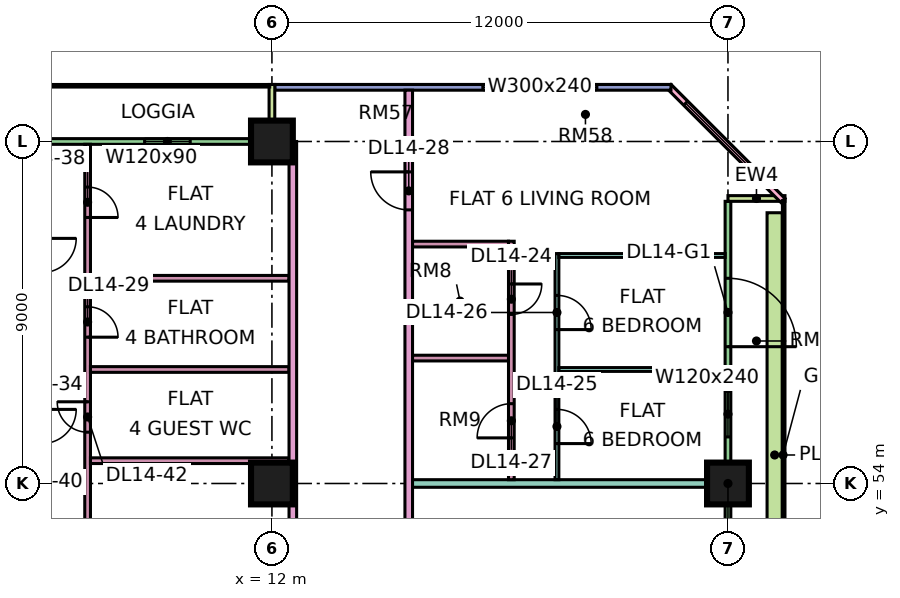
"""IFC4 building model, lengths in metres.
Left out: names, types, materials, properties, quantities, classifications, styles, units other than length and angle.
Written with IfcOpenShell. Run it as: python <this file> out.ifc"""

import sys

from ifc_helpers import new_model, si_unit, direction, frame, frame_2d, origin, origin_2d, place, context, subcontext, project, spatial, rectangle, extrude, element, fill, save


model = new_model("IFC4")
c1 = context("Model", 3, precision=1e-05, world=origin(), true_north=direction((0.0, 1.0)))
c2 = subcontext(c1, "Body", "Model", "MODEL_VIEW")
j1 = project(units=[si_unit("LENGTHUNIT", "METRE"), si_unit("PLANEANGLEUNIT", "RADIAN")], contexts=[c1])
p1 = place(None, origin())
s1 = spatial("IfcSite", under=j1, at=p1, CompositionType="ELEMENT")
p2 = place(p1, origin())
s2 = spatial("IfcBuilding", under=s1, at=p2, CompositionType="ELEMENT")
p3 = place(p2, frame((0.0, 0.0, 67.65)))
s3 = spatial("IfcBuildingStorey", under=s2, at=p3, CompositionType="ELEMENT", Elevation=67.65)
for number, where, z_axis, x_axis in (
    (1, (12.0, 54.0, 0.0), (0.0, 0.0, 1.0), (1.0, 0.0, 0.0)),
    (2, (12.0, 63.0, 0.0), (0.0, 0.0, 1.0), (1.0, 0.0, 0.0)),
    (3, (24.0, 54.0, 0.0), (0.0, 0.0, 1.0), (1.0, 0.0, 0.0)),
):
    element("IfcColumn", number, at=place(p3, frame(where, z_axis=z_axis, x_axis=x_axis)), inside=s3, PredefinedType="COLUMN", context=c2, shape_type="SweptSolid", body=[
        extrude(rectangle(XDim=1.1, YDim=1.1, at=origin_2d()), origin(), (0.0, 0.0, 1.0), 3.75),
    ])
p4 = place(p3, frame((24.0, 48.075, 0.0), z_axis=(0.0, 0.0, 1.0), x_axis=(0.0, 1.0, 0.0)))
e4 = element("IfcWall", 4, at=p4, inside=s3, PredefinedType="SOLIDWALL", context=c2, shape_type="SweptSolid", body=[
    extrude(rectangle(XDim=13.35, YDim=0.15, at=frame_2d((6.675, 0.0))), origin(), (0.0, 0.0, 1.0), 3.35),
])
p5 = place(p4, frame((0.538, 0.0, 0.45)))
e5 = element("IfcOpeningElement", 5, at=p5, cuts=e4, PredefinedType="OPENING", context=c2, shape_type="SweptSolid", body=[
    extrude(rectangle(XDim=4.2, YDim=2.4, at=frame_2d((2.1, 1.2))), frame((0.0, 0.085, 0.0), z_axis=(0.0, -1.0, 0.0), x_axis=(1.0, 0.0, 0.0)), (0.0, 0.0, 1.0), 0.17),
])
p6 = place(p4, frame((7.15, 0.0, 0.45)))
e6 = element("IfcOpeningElement", 6, at=p6, cuts=e4, PredefinedType="OPENING", context=c2, shape_type="SweptSolid", body=[
    extrude(rectangle(XDim=1.2, YDim=2.4, at=frame_2d((0.6, 1.2))), frame((0.0, 0.085, 0.0), z_axis=(0.0, -1.0, 0.0), x_axis=(1.0, 0.0, 0.0)), (0.0, 0.0, 1.0), 0.17),
])
p7 = place(p4, frame((9.525, 0.0, 0.0)))
e7 = element("IfcOpeningElement", 7, at=p7, cuts=e4, PredefinedType="OPENING", context=c2, shape_type="SweptSolid", body=[
    extrude(rectangle(XDim=1.8, YDim=2.4, at=frame_2d((0.9, 1.2))), frame((0.0, 0.085, 0.0), z_axis=(0.0, -1.0, 0.0), x_axis=(1.0, 0.0, 0.0)), (0.0, 0.0, 1.0), 0.17),
])
p8 = place(p3, frame((25.5, 61.5, 0.0), z_axis=(0.0, 0.0, 1.0), x_axis=(-1.0, 0.0, 0.0)))
e8 = element("IfcWall", 8, at=p8, inside=s3, PredefinedType="SOLIDWALL", context=c2, shape_type="SweptSolid", body=[
    extrude(rectangle(XDim=1.5, YDim=0.15, at=frame_2d((0.75, 0.0))), origin(), (0.0, 0.0, 1.0), 3.35),
])
p9 = place(p3, frame((25.447, 61.447, 0.0), z_axis=(0.0, 0.0, 1.0), x_axis=(-0.707106781187, 0.707106781187, 0.0)))
e9 = element("IfcWall", 9, at=p9, inside=s3, PredefinedType="SOLIDWALL", context=c2, shape_type="SweptSolid", body=[
    extrude(rectangle(XDim=4.243, YDim=0.15, at=frame_2d((2.121, 0.0))), origin(), (0.0, 0.0, 1.0), 3.35),
])
p10 = place(p9, frame((0.621, 0.0, 0.45)))
e10 = element("IfcOpeningElement", 10, at=p10, cuts=e9, PredefinedType="OPENING", context=c2, shape_type="SweptSolid", body=[
    extrude(rectangle(XDim=3.0, YDim=2.4, at=frame_2d((1.5, 1.2))), frame((0.0, 0.085, 0.0), z_axis=(0.0, -1.0, 0.0), x_axis=(1.0, 0.0, 0.0)), (0.0, 0.0, 1.0), 0.17),
])
p11 = place(p3, frame((22.5, 64.425, 0.0), z_axis=(0.0, 0.0, 1.0), x_axis=(-1.0, 0.0, 0.0)))
e11 = element("IfcWall", 11, at=p11, inside=s3, PredefinedType="SOLIDWALL", context=c2, shape_type="SweptSolid", body=[
    extrude(rectangle(XDim=10.425, YDim=0.15, at=frame_2d((5.212, 0.0))), origin(), (0.0, 0.0, 1.0), 3.35),
])
p12 = place(p11, frame((1.95, 0.0, 0.45)))
e12 = element("IfcOpeningElement", 12, at=p12, cuts=e11, PredefinedType="OPENING", context=c2, shape_type="SweptSolid", body=[
    extrude(rectangle(XDim=3.0, YDim=2.4, at=frame_2d((1.5, 1.2))), frame((0.0, 0.085, 0.0), z_axis=(0.0, -1.0, 0.0), x_axis=(1.0, 0.0, 0.0)), (0.0, 0.0, 1.0), 0.17),
])
p13 = place(p3, frame((11.925, 63.0, 0.0), z_axis=(0.0, 0.0, 1.0), x_axis=(-1.0, 0.0, 0.0)))
e13 = element("IfcWall", 13, at=p13, inside=s3, PredefinedType="SOLIDWALL", context=c2, shape_type="SweptSolid", body=[
    extrude(rectangle(XDim=10.35, YDim=0.15, at=frame_2d((5.175, 0.0))), origin(), (0.0, 0.0, 1.0), 3.35),
])
p14 = place(p13, frame((2.075, 0.0, 1.7)))
e14 = element("IfcOpeningElement", 14, at=p14, cuts=e13, PredefinedType="OPENING", context=c2, shape_type="SweptSolid", body=[
    extrude(rectangle(XDim=1.2, YDim=0.9, at=frame_2d((0.6, 0.45))), frame((0.0, 0.085, 0.0), z_axis=(0.0, -1.0, 0.0), x_axis=(1.0, 0.0, 0.0)), (0.0, 0.0, 1.0), 0.17),
])
p15 = place(p13, frame((7.262, 0.0, 0.0)))
e15 = element("IfcOpeningElement", 15, at=p15, cuts=e13, PredefinedType="OPENING", context=c2, shape_type="SweptSolid", body=[
    extrude(rectangle(XDim=1.8, YDim=2.4, at=frame_2d((0.9, 1.2))), frame((0.0, 0.085, 0.0), z_axis=(0.0, -1.0, 0.0), x_axis=(1.0, 0.0, 0.0)), (0.0, 0.0, 1.0), 0.17),
])
p16 = place(p3, frame((12.0, 64.5, 0.0), z_axis=(0.0, 0.0, 1.0), x_axis=(0.0, -1.0, 0.0)))
e16 = element("IfcWall", 16, at=p16, inside=s3, PredefinedType="SOLIDWALL", context=c2, shape_type="SweptSolid", body=[
    extrude(rectangle(XDim=1.5, YDim=0.15, at=frame_2d((0.75, 0.0))), origin(), (0.0, 0.0, 1.0), 3.35),
])
p17 = place(p3, frame((25.229, 48.375, 0.0), z_axis=(0.0, 0.0, 1.0), x_axis=(0.0, 1.0, 0.0)))
e17 = element("IfcWall", 17, at=p17, inside=s3, PredefinedType="SOLIDWALL", context=c2, shape_type="SweptSolid", body=[
    extrude(rectangle(XDim=12.75, YDim=0.4, at=frame_2d((6.375, 0.0))), origin(), (0.0, 0.0, 1.0), 0.7),
])
p18 = place(p3, frame((7.15, 48.25, 0.0), z_axis=(0.0, 0.0, 1.0), x_axis=(0.0, 1.0, 0.0)))
e18 = element("IfcWall", 18, at=p18, inside=s3, PredefinedType="PARTITIONING", context=c2, shape_type="SweptSolid", body=[
    extrude(rectangle(XDim=14.676, YDim=0.15, at=frame_2d((7.338, 0.0))), origin(), (0.0, 0.0, 1.0), 3.35),
])
p19 = place(p18, frame((9.6, 0.0, 0.0)))
e19 = element("IfcOpeningElement", 19, at=p19, cuts=e18, PredefinedType="OPENING", context=c2, shape_type="SweptSolid", body=[
    extrude(rectangle(XDim=0.8, YDim=2.1, at=frame_2d((0.4, 1.05))), frame((0.0, 0.085, 0.0), z_axis=(0.0, -1.0, 0.0), x_axis=(1.0, 0.0, 0.0)), (0.0, 0.0, 1.0), 0.17),
])
p20 = place(p18, frame((12.75, 0.0, 0.0)))
e20 = element("IfcOpeningElement", 20, at=p20, cuts=e18, PredefinedType="OPENING", context=c2, shape_type="SweptSolid", body=[
    extrude(rectangle(XDim=0.8, YDim=2.1, at=frame_2d((0.4, 1.05))), frame((0.0, 0.085, 0.0), z_axis=(0.0, -1.0, 0.0), x_axis=(1.0, 0.0, 0.0)), (0.0, 0.0, 1.0), 0.17),
])
p21 = place(p18, frame((7.1, 0.0, 0.0)))
e21 = element("IfcOpeningElement", 21, at=p21, cuts=e18, PredefinedType="OPENING", context=c2, shape_type="SweptSolid", body=[
    extrude(rectangle(XDim=0.8, YDim=2.1, at=frame_2d((0.4, 1.05))), frame((0.0, 0.085, 0.0), z_axis=(0.0, -1.0, 0.0), x_axis=(1.0, 0.0, 0.0)), (0.0, 0.0, 1.0), 0.17),
])
for number, where, z_axis, x_axis in (
    (22, (7.225, 54.6, 0.0), (0.0, 0.0, 1.0), (1.0, 0.0, 0.0)),
    (23, (7.225, 57.0, 0.0), (0.0, 0.0, 1.0), (1.0, 0.0, 0.0)),
    (24, (7.225, 59.4, 0.0), (0.0, 0.0, 1.0), (1.0, 0.0, 0.0)),
):
    element("IfcWall", number, at=place(p3, frame(where, z_axis=z_axis, x_axis=x_axis)), inside=s3, PredefinedType="PARTITIONING", context=c2, shape_type="SweptSolid", body=[
        extrude(rectangle(XDim=5.225, YDim=0.15, at=frame_2d((2.612, 0.0))), origin(), (0.0, 0.0, 1.0), 3.35),
    ])
p22 = place(p3, frame((12.55, 20.0, 0.0), z_axis=(0.0, 0.0, 1.0), x_axis=(0.0, 1.0, 0.0)))
e25 = element("IfcWall", 25, at=p22, inside=s3, PredefinedType="PARTITIONING", context=c2, shape_type="SweptSolid", body=[
    extrude(rectangle(XDim=43.0, YDim=0.2, at=frame_2d((21.5, 0.0))), origin(), (0.0, 0.0, 1.0), 3.35),
])
p23 = place(p22, frame((25.8, 0.0, 0.0)))
e26 = element("IfcOpeningElement", 26, at=p23, cuts=e25, PredefinedType="OPENING", context=c2, shape_type="SweptSolid", body=[
    extrude(rectangle(XDim=1.0, YDim=2.1, at=frame_2d((0.5, 1.05))), frame((0.0, 0.11, 0.0), z_axis=(0.0, -1.0, 0.0), x_axis=(1.0, 0.0, 0.0)), (0.0, 0.0, 1.0), 0.22),
])
p24 = place(p22, frame((0.6, 0.0, 0.0)))
e27 = element("IfcOpeningElement", 27, at=p24, cuts=e25, PredefinedType="OPENING", context=c2, shape_type="SweptSolid", body=[
    extrude(rectangle(XDim=1.2, YDim=2.1, at=frame_2d((0.6, 1.05))), frame((0.0, 0.11, 0.0), z_axis=(0.0, -1.0, 0.0), x_axis=(1.0, 0.0, 0.0)), (0.0, 0.0, 1.0), 0.22),
])
p25 = place(p22, frame((14.25, 0.0, 0.0)))
e28 = element("IfcOpeningElement", 28, at=p25, cuts=e25, PredefinedType="OPENING", context=c2, shape_type="SweptSolid", body=[
    extrude(rectangle(XDim=1.0, YDim=2.1, at=frame_2d((0.5, 1.05))), frame((0.0, 0.11, 0.0), z_axis=(0.0, -1.0, 0.0), x_axis=(1.0, 0.0, 0.0)), (0.0, 0.0, 1.0), 0.22),
])
p26 = place(p3, frame((15.6, 51.225, 0.0), z_axis=(0.0, 0.0, 1.0), x_axis=(0.0, 1.0, 0.0)))
e29 = element("IfcWall", 29, at=p26, inside=s3, PredefinedType="PARTITIONING", context=c2, shape_type="SweptSolid", body=[
    extrude(rectangle(XDim=13.125, YDim=0.2, at=frame_2d((6.562, 0.0))), origin(), (0.0, 0.0, 1.0), 3.35),
])
p27 = place(p26, frame((9.975, 0.0, 0.0)))
e30 = element("IfcOpeningElement", 30, at=p27, cuts=e29, PredefinedType="OPENING", context=c2, shape_type="SweptSolid", body=[
    extrude(rectangle(XDim=1.0, YDim=2.1, at=frame_2d((0.5, 1.05))), frame((0.0, 0.11, 0.0), z_axis=(0.0, -1.0, 0.0), x_axis=(1.0, 0.0, 0.0)), (0.0, 0.0, 1.0), 0.22),
])
p28 = place(p3, frame((15.7, 54.0, 0.0), z_axis=(0.0, 0.0, 1.0), x_axis=(1.0, 0.0, 0.0)))
e31 = element("IfcWall", 31, at=p28, inside=s3, PredefinedType="PARTITIONING", context=c2, shape_type="SweptSolid", body=[
    extrude(rectangle(XDim=8.226, YDim=0.2, at=frame_2d((4.113, 0.0))), origin(), (0.0, 0.0, 1.0), 3.35),
])
for number, where, z_axis, x_axis in (
    (32, (15.7, 57.3, 0.0), (0.0, 0.0, 1.0), (1.0, 0.0, 0.0)),
    (33, (15.7, 60.3, 0.0), (0.0, 0.0, 1.0), (1.0, 0.0, 0.0)),
):
    element("IfcWall", number, at=place(p3, frame(where, z_axis=z_axis, x_axis=x_axis)), inside=s3, PredefinedType="PARTITIONING", context=c2, shape_type="SweptSolid", body=[
        extrude(rectangle(XDim=2.525, YDim=0.15, at=frame_2d((1.263, 0.0))), origin(), (0.0, 0.0, 1.0), 3.35),
    ])
p29 = place(p3, frame((18.3, 54.1, 0.0), z_axis=(0.0, 0.0, 1.0), x_axis=(0.0, 1.0, 0.0)))
e34 = element("IfcWall", 34, at=p29, inside=s3, PredefinedType="PARTITIONING", context=c2, shape_type="SweptSolid", body=[
    extrude(rectangle(XDim=6.275, YDim=0.15, at=frame_2d((3.137, 0.0))), origin(), (0.0, 0.0, 1.0), 3.35),
])
p30 = place(p29, frame((4.35, 0.0, 0.0)))
e35 = element("IfcOpeningElement", 35, at=p30, cuts=e34, PredefinedType="OPENING", context=c2, shape_type="SweptSolid", body=[
    extrude(rectangle(XDim=0.8, YDim=2.1, at=frame_2d((0.4, 1.05))), frame((0.0, 0.085, 0.0), z_axis=(0.0, -1.0, 0.0), x_axis=(1.0, 0.0, 0.0)), (0.0, 0.0, 1.0), 0.17),
])
p31 = place(p29, frame((1.1, 0.0, 0.0)))
e36 = element("IfcOpeningElement", 36, at=p31, cuts=e34, PredefinedType="OPENING", context=c2, shape_type="SweptSolid", body=[
    extrude(rectangle(XDim=0.9, YDim=2.1, at=frame_2d((0.45, 1.05))), frame((0.0, 0.085, 0.0), z_axis=(0.0, -1.0, 0.0), x_axis=(1.0, 0.0, 0.0)), (0.0, 0.0, 1.0), 0.17),
])
p32 = place(p3, frame((19.5, 54.1, 0.0), z_axis=(0.0, 0.0, 1.0), x_axis=(0.0, 1.0, 0.0)))
e37 = element("IfcWall", 37, at=p32, inside=s3, PredefinedType="PARTITIONING", context=c2, shape_type="SweptSolid", body=[
    extrude(rectangle(XDim=5.95, YDim=0.1, at=frame_2d((2.975, 0.0))), origin(), (0.0, 0.0, 1.0), 3.35),
])
p33 = place(p32, frame((0.95, 0.0, 0.0)))
e38 = element("IfcOpeningElement", 38, at=p33, cuts=e37, PredefinedType="OPENING", context=c2, shape_type="SweptSolid", body=[
    extrude(rectangle(XDim=0.9, YDim=2.1, at=frame_2d((0.45, 1.05))), frame((0.0, 0.06, 0.0), z_axis=(0.0, -1.0, 0.0), x_axis=(1.0, 0.0, 0.0)), (0.0, 0.0, 1.0), 0.12),
])
p34 = place(p32, frame((3.95, 0.0, 0.0)))
e39 = element("IfcOpeningElement", 39, at=p34, cuts=e37, PredefinedType="OPENING", context=c2, shape_type="SweptSolid", body=[
    extrude(rectangle(XDim=0.9, YDim=2.1, at=frame_2d((0.45, 1.05))), frame((0.0, 0.06, 0.0), z_axis=(0.0, -1.0, 0.0), x_axis=(1.0, 0.0, 0.0)), (0.0, 0.0, 1.0), 0.12),
])
for number, where, z_axis, x_axis in (
    (40, (19.55, 57.0, 0.0), (0.0, 0.0, 1.0), (1.0, 0.0, 0.0)),
    (41, (19.55, 60.0, 0.0), (0.0, 0.0, 1.0), (1.0, 0.0, 0.0)),
):
    element("IfcWall", number, at=place(p3, frame(where, z_axis=z_axis, x_axis=x_axis)), inside=s3, PredefinedType="PARTITIONING", context=c2, shape_type="SweptSolid", body=[
        extrude(rectangle(XDim=4.376, YDim=0.1, at=frame_2d((2.188, 0.0))), origin(), (0.0, 0.0, 1.0), 3.35),
    ])
p35 = place(p6, origin())
e42 = element("IfcWindow", 42, at=p35, inside=s3, PartitioningType="SINGLE_PANEL", PredefinedType="WINDOW", context=c2, shape_type="SweptSolid", body=[
    extrude(rectangle(XDim=1.2, YDim=2.4, at=frame_2d((0.6, 1.2))), frame((0.0, 0.03, 0.0), z_axis=(0.0, -1.0, 0.0), x_axis=(1.0, 0.0, 0.0)), (0.0, 0.0, 1.0), 0.06),
])
fill(e6, e42)
p36 = place(p7, frame((1.8, 0.0, 0.0), z_axis=(0.0, 0.0, 1.0), x_axis=(-1.0, 0.0, 0.0)))
e43 = element("IfcDoor", 43, at=p36, inside=s3, OperationType="DOUBLE_DOOR_SINGLE_SWING", PredefinedType="DOOR", context=c2, shape_type="SweptSolid", body=[
    extrude(rectangle(XDim=1.8, YDim=2.4, at=frame_2d((0.9, 1.2))), frame((0.0, 0.025, 0.0), z_axis=(0.0, -1.0, 0.0), x_axis=(1.0, 0.0, 0.0)), (0.0, 0.0, 1.0), 0.05),
])
fill(e7, e43)
p37 = place(p10, origin())
e44 = element("IfcWindow", 44, at=p37, inside=s3, PartitioningType="SINGLE_PANEL", PredefinedType="WINDOW", context=c2, shape_type="SweptSolid", body=[
    extrude(rectangle(XDim=3.0, YDim=2.4, at=frame_2d((1.5, 1.2))), frame((0.0, 0.03, 0.0), z_axis=(0.0, -1.0, 0.0), x_axis=(1.0, 0.0, 0.0)), (0.0, 0.0, 1.0), 0.06),
])
fill(e10, e44)
p38 = place(p12, origin())
e45 = element("IfcWindow", 45, at=p38, inside=s3, PartitioningType="SINGLE_PANEL", PredefinedType="WINDOW", context=c2, shape_type="SweptSolid", body=[
    extrude(rectangle(XDim=3.0, YDim=2.4, at=frame_2d((1.5, 1.2))), frame((0.0, 0.03, 0.0), z_axis=(0.0, -1.0, 0.0), x_axis=(1.0, 0.0, 0.0)), (0.0, 0.0, 1.0), 0.06),
])
fill(e12, e45)
p39 = place(p14, origin())
e46 = element("IfcWindow", 46, at=p39, inside=s3, PartitioningType="SINGLE_PANEL", PredefinedType="WINDOW", context=c2, shape_type="SweptSolid", body=[
    extrude(rectangle(XDim=1.2, YDim=0.9, at=frame_2d((0.6, 0.45))), frame((0.0, 0.03, 0.0), z_axis=(0.0, -1.0, 0.0), x_axis=(1.0, 0.0, 0.0)), (0.0, 0.0, 1.0), 0.06),
])
fill(e14, e46)
p40 = place(p30, origin())
e47 = element("IfcDoor", 47, at=p40, inside=s3, OperationType="SINGLE_SWING_RIGHT", PredefinedType="DOOR", context=c2, shape_type="SweptSolid", body=[
    extrude(rectangle(XDim=0.8, YDim=2.1, at=frame_2d((0.4, 1.05))), frame((0.0, 0.025, 0.0), z_axis=(0.0, -1.0, 0.0), x_axis=(1.0, 0.0, 0.0)), (0.0, 0.0, 1.0), 0.05),
])
fill(e35, e47)
p41 = place(p33, frame((0.9, 0.0, 0.0), z_axis=(0.0, 0.0, 1.0), x_axis=(-1.0, 0.0, 0.0)))
e48 = element("IfcDoor", 48, at=p41, inside=s3, OperationType="SINGLE_SWING_LEFT", PredefinedType="DOOR", context=c2, shape_type="SweptSolid", body=[
    extrude(rectangle(XDim=0.9, YDim=2.1, at=frame_2d((0.45, 1.05))), frame((0.0, 0.025, 0.0), z_axis=(0.0, -1.0, 0.0), x_axis=(1.0, 0.0, 0.0)), (0.0, 0.0, 1.0), 0.05),
])
fill(e38, e48)
p42 = place(p34, frame((0.9, 0.0, 0.0), z_axis=(0.0, 0.0, 1.0), x_axis=(-1.0, 0.0, 0.0)))
e49 = element("IfcDoor", 49, at=p42, inside=s3, OperationType="SINGLE_SWING_LEFT", PredefinedType="DOOR", context=c2, shape_type="SweptSolid", body=[
    extrude(rectangle(XDim=0.9, YDim=2.1, at=frame_2d((0.45, 1.05))), frame((0.0, 0.025, 0.0), z_axis=(0.0, -1.0, 0.0), x_axis=(1.0, 0.0, 0.0)), (0.0, 0.0, 1.0), 0.05),
])
fill(e39, e49)
p43 = place(p31, origin())
e50 = element("IfcDoor", 50, at=p43, inside=s3, OperationType="SINGLE_SWING_LEFT", PredefinedType="DOOR", context=c2, shape_type="SweptSolid", body=[
    extrude(rectangle(XDim=0.9, YDim=2.1, at=frame_2d((0.45, 1.05))), frame((0.0, 0.025, 0.0), z_axis=(0.0, -1.0, 0.0), x_axis=(1.0, 0.0, 0.0)), (0.0, 0.0, 1.0), 0.05),
])
fill(e36, e50)
p44 = place(p27, frame((1.0, 0.0, 0.0), z_axis=(0.0, 0.0, 1.0), x_axis=(-1.0, 0.0, 0.0)))
e51 = element("IfcDoor", 51, at=p44, inside=s3, OperationType="SINGLE_SWING_RIGHT", PredefinedType="DOOR", context=c2, shape_type="SweptSolid", body=[
    extrude(rectangle(XDim=1.0, YDim=2.1, at=frame_2d((0.5, 1.05))), frame((0.0, 0.025, 0.0), z_axis=(0.0, -1.0, 0.0), x_axis=(1.0, 0.0, 0.0)), (0.0, 0.0, 1.0), 0.05),
])
fill(e30, e51)
p45 = place(p19, frame((0.8, 0.0, 0.0), z_axis=(0.0, 0.0, 1.0), x_axis=(-1.0, 0.0, 0.0)))
e52 = element("IfcDoor", 52, at=p45, inside=s3, OperationType="SINGLE_SWING_LEFT", PredefinedType="DOOR", context=c2, shape_type="SweptSolid", body=[
    extrude(rectangle(XDim=0.8, YDim=2.1, at=frame_2d((0.4, 1.05))), frame((0.0, 0.025, 0.0), z_axis=(0.0, -1.0, 0.0), x_axis=(1.0, 0.0, 0.0)), (0.0, 0.0, 1.0), 0.05),
])
fill(e19, e52)
p46 = place(p20, frame((0.8, 0.0, 0.0), z_axis=(0.0, 0.0, 1.0), x_axis=(-1.0, 0.0, 0.0)))
e53 = element("IfcDoor", 53, at=p46, inside=s3, OperationType="SINGLE_SWING_LEFT", PredefinedType="DOOR", context=c2, shape_type="SweptSolid", body=[
    extrude(rectangle(XDim=0.8, YDim=2.1, at=frame_2d((0.4, 1.05))), frame((0.0, 0.025, 0.0), z_axis=(0.0, -1.0, 0.0), x_axis=(1.0, 0.0, 0.0)), (0.0, 0.0, 1.0), 0.05),
])
fill(e20, e53)
p47 = place(p21, frame((0.8, 0.0, 0.0), z_axis=(0.0, 0.0, 1.0), x_axis=(-1.0, 0.0, 0.0)))
e54 = element("IfcDoor", 54, at=p47, inside=s3, OperationType="SINGLE_SWING_RIGHT", PredefinedType="DOOR", context=c2, shape_type="SweptSolid", body=[
    extrude(rectangle(XDim=0.8, YDim=2.1, at=frame_2d((0.4, 1.05))), frame((0.0, 0.025, 0.0), z_axis=(0.0, -1.0, 0.0), x_axis=(1.0, 0.0, 0.0)), (0.0, 0.0, 1.0), 0.05),
])
fill(e21, e54)
save(model, sys.argv[1])
